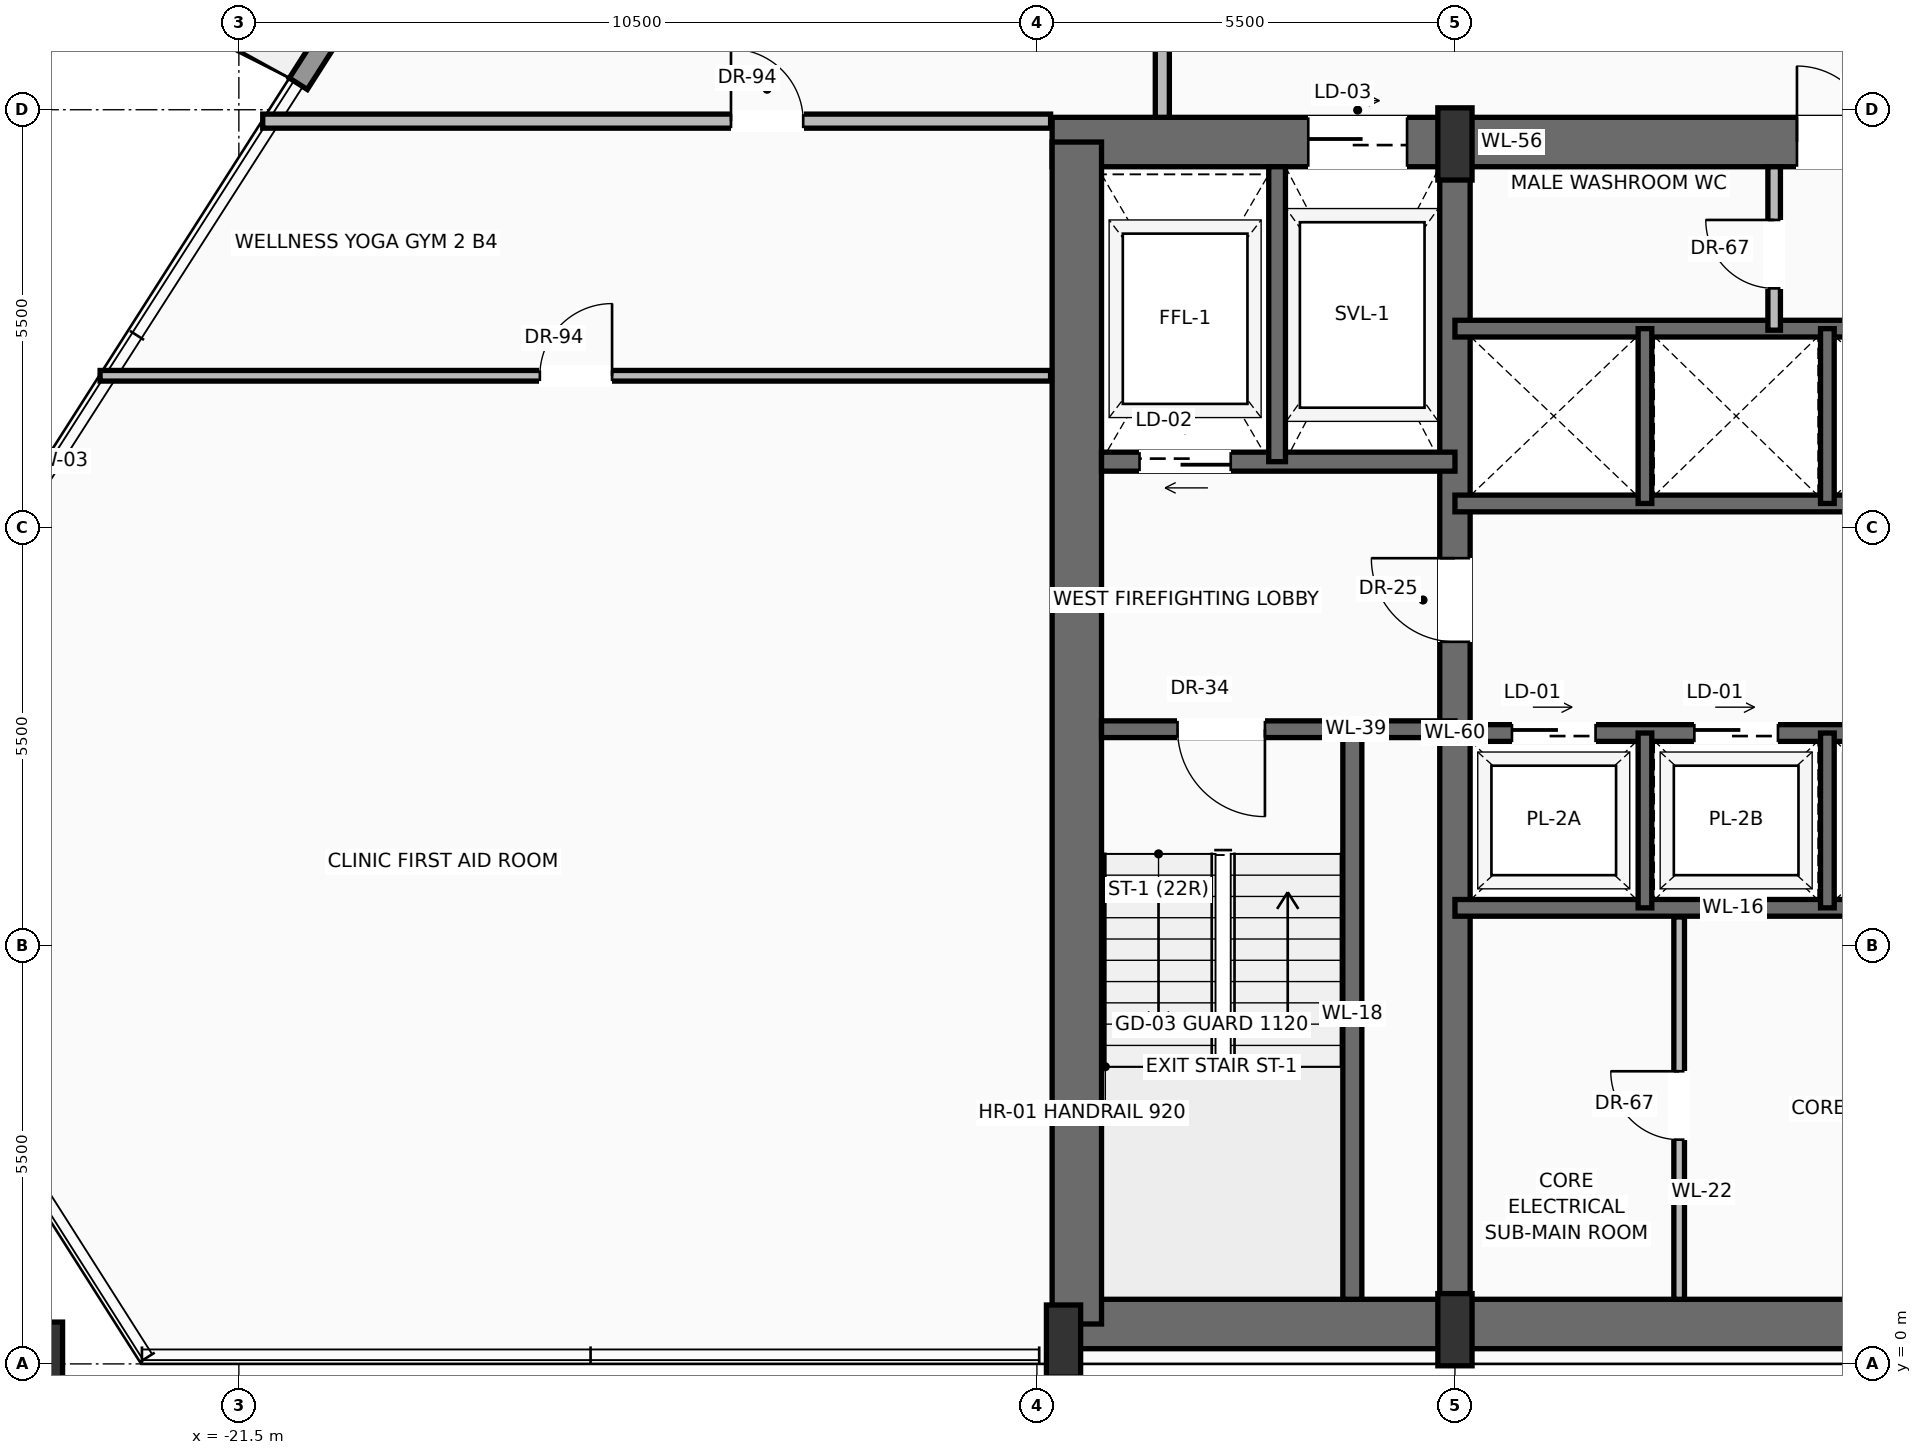
"""IFC4 building model, lengths in metres.
Left out: names, types, materials, properties, quantities, classifications, styles, units other than length and angle.
Written with IfcOpenShell. Run it as: python <this file> out.ifc"""

import sys

from ifc_helpers import new_model, si_unit, direction, frame, frame_2d, origin, origin_2d, place, context, subcontext, project, spatial, rectangle, hollow_rectangle, extrude, source, transform, mapped, element, fill, save


model = new_model("IFC4")
c1 = context("Model", 3, precision=1e-05, world=origin(), true_north=direction((0.0, 1.0)))
c2 = subcontext(c1, "Body", "Model", "MODEL_VIEW")
j1 = project(units=[si_unit("LENGTHUNIT", "METRE"), si_unit("PLANEANGLEUNIT", "RADIAN")], contexts=[c1])
p1 = place(None, origin())
s1 = spatial("IfcSite", under=j1, at=p1, CompositionType="ELEMENT")
p2 = place(p1, origin())
s2 = spatial("IfcBuilding", under=s1, at=p2, CompositionType="ELEMENT")
p3 = place(p2, frame((0.0, 0.0, 158.9)))
s3 = spatial("IfcBuildingStorey", under=s2, at=p3, CompositionType="ELEMENT", Elevation=158.9)
p4 = place(p3, frame((-10.65, 0.525, 0.0), z_axis=(0.0, 0.0, 1.0), x_axis=(1.0, 0.0, 0.0)))
e1 = element("IfcWall", 1, at=p4, inside=s3, PredefinedType="SHEAR", context=c2, shape_type="SweptSolid", body=[
    extrude(rectangle(XDim=21.3, YDim=0.65, at=frame_2d((10.65, 0.0))), origin(), (0.0, 0.0, 1.0), 3.47),
])
p5 = place(p3, frame((-10.8, 16.075, 0.0), z_axis=(0.0, 0.0, 1.0), x_axis=(1.0, 0.0, 0.0)))
e2 = element("IfcWall", 2, at=p5, inside=s3, PredefinedType="SHEAR", context=c2, shape_type="SweptSolid", body=[
    extrude(rectangle(XDim=21.6, YDim=0.65, at=frame_2d((10.8, 0.0))), origin(), (0.0, 0.0, 1.0), 3.47),
])
p6 = place(p5, frame((3.37, 0.0, 0.0)))
e3 = element("IfcOpeningElement", 3, at=p6, cuts=e2, PredefinedType="OPENING", context=c2, shape_type="SweptSolid", body=[
    extrude(rectangle(XDim=1.3, YDim=2.3, at=frame_2d((0.65, 1.15))), frame((0.0, 0.335, 0.0), z_axis=(0.0, -1.0, 0.0), x_axis=(1.0, 0.0, 0.0)), (0.0, 0.0, 1.0), 0.67),
])
p7 = place(p5, frame((9.8, 0.0, 0.0)))
e4 = element("IfcOpeningElement", 4, at=p7, cuts=e2, PredefinedType="OPENING", context=c2, shape_type="SweptSolid", body=[
    extrude(rectangle(XDim=2.0, YDim=2.4, at=frame_2d((1.0, 1.2))), frame((0.0, 0.335, 0.0), z_axis=(0.0, -1.0, 0.0), x_axis=(1.0, 0.0, 0.0)), (0.0, 0.0, 1.0), 0.67),
])
p8 = place(p3, frame((-10.475, 0.525, 0.0), z_axis=(0.0, 0.0, 1.0), x_axis=(0.0, 1.0, 0.0)))
e5 = element("IfcWall", 5, at=p8, inside=s3, PredefinedType="SHEAR", context=c2, shape_type="SweptSolid", body=[
    extrude(rectangle(XDim=15.55, YDim=0.65, at=frame_2d((7.775, 0.0))), origin(), (0.0, 0.0, 1.0), 3.47),
])
p9 = place(p3, frame((-5.5, 0.525, 0.0), z_axis=(0.0, 0.0, 1.0), x_axis=(0.0, 1.0, 0.0)))
e6 = element("IfcWall", 6, at=p9, inside=s3, PredefinedType="SHEAR", context=c2, shape_type="SweptSolid", body=[
    extrude(rectangle(XDim=15.55, YDim=0.4, at=frame_2d((7.775, 0.0))), origin(), (0.0, 0.0, 1.0), 3.47),
])
p10 = place(p9, frame((8.975, 0.0, 0.0)))
e7 = element("IfcOpeningElement", 7, at=p10, cuts=e6, PredefinedType="OPENING", context=c2, shape_type="SweptSolid", body=[
    extrude(rectangle(XDim=1.1, YDim=2.2, at=frame_2d((0.55, 1.1))), frame((0.0, 0.21, 0.0), z_axis=(0.0, -1.0, 0.0), x_axis=(1.0, 0.0, 0.0)), (0.0, 0.0, 1.0), 0.42),
])
m1 = source(origin(), c2, "Body", "SweptSolid", [
    extrude(rectangle(XDim=0.45, YDim=0.95, at=origin_2d()), origin(), (0.0, 0.0, 1.0), 3.7),
])
for number, where, z_axis, x_axis in (
    (8, (-10.65, 0.3, 0.0), (0.0, 0.0, 1.0), (1.0, 0.0, 0.0)),
    (9, (-5.5, 0.45, 0.0), (0.0, 0.0, 1.0), (1.0, 0.0, 0.0)),
    (10, (-5.5, 16.05, 0.0), (0.0, 0.0, 1.0), (1.0, 0.0, 0.0)),
):
    element("IfcColumn", number, at=place(p3, frame(where, z_axis=z_axis, x_axis=x_axis)), inside=s3, PredefinedType="PILASTER", context=c2, shape_type="MappedRepresentation", body=[
        mapped(m1, transform((0.0, 0.0, 0.0), scale=1.0)),
    ])
m2 = source(origin(), c2, "Body", "SweptSolid", [
    extrude(hollow_rectangle(XDim=1.1, YDim=1.1, WallThickness=0.055, at=origin_2d()), origin(), (0.0, 0.0, 1.0), 3.692),
])
p11 = place(p3, frame((-24.369, 0.0, 0.004), z_axis=(-0.009391120248, 0.0, 0.999955902458), x_axis=(0.0, -1.0, 0.0)))
e11 = element("IfcColumn", 11, at=p11, inside=s3, PredefinedType="COLUMN", context=c2, shape_type="MappedRepresentation", body=[
    mapped(m2, transform((0.0, 0.0, 0.0), scale=1.0)),
])
p12 = place(p3, frame((-20.718, 16.842, 0.0), z_axis=(0.0, 0.0, 1.0), x_axis=(0.538291588768, 0.842758663831, 0.0)))
e12 = element("IfcWall", 12, at=p12, inside=s3, PredefinedType="SOLIDWALL", context=c2, shape_type="SweptSolid", body=[
    extrude(rectangle(XDim=18.586, YDim=0.28, at=frame_2d((9.293, 0.0))), origin(), (0.0, 0.0, 1.0), 3.05),
])
p13 = place(p12, frame((4.461, 0.0, 0.0)))
e13 = element("IfcOpeningElement", 13, at=p13, cuts=e12, PredefinedType="OPENING", context=c2, shape_type="SweptSolid", body=[
    extrude(rectangle(XDim=1.6, YDim=2.35, at=frame_2d((0.8, 1.175))), frame((0.0, 0.15, 0.0), z_axis=(0.0, -1.0, 0.0), x_axis=(1.0, 0.0, 0.0)), (0.0, 0.0, 1.0), 0.3),
])
p14 = place(p12, frame((12.639, 0.0, 0.9)))
e14 = element("IfcOpeningElement", 14, at=p14, cuts=e12, PredefinedType="OPENING", context=c2, shape_type="SweptSolid", body=[
    extrude(rectangle(XDim=2.0, YDim=1.85, at=frame_2d((1.0, 0.925))), frame((0.0, 0.15, 0.0), z_axis=(0.0, -1.0, 0.0), x_axis=(1.0, 0.0, 0.0)), (0.0, 0.0, 1.0), 0.3),
])
p15 = place(p3, frame((-6.85, 0.85, 0.0), z_axis=(0.0, 0.0, 1.0), x_axis=(0.0, 1.0, 0.0)))
e15 = element("IfcWall", 15, at=p15, inside=s3, PredefinedType="SOLIDWALL", context=c2, shape_type="SweptSolid", body=[
    extrude(rectangle(XDim=7.5, YDim=0.25, at=frame_2d((3.75, 0.0))), origin(), (0.0, 0.0, 1.0), 3.47),
])
p16 = place(p3, frame((-5.5, 8.35, 0.0), z_axis=(0.0, 0.0, 1.0), x_axis=(-1.0, 0.0, 0.0)))
e16 = element("IfcWall", 16, at=p16, inside=s3, PredefinedType="SOLIDWALL", context=c2, shape_type="SweptSolid", body=[
    extrude(rectangle(XDim=4.65, YDim=0.22, at=frame_2d((2.325, 0.0))), origin(), (0.0, 0.0, 1.0), 3.47),
])
p17 = place(p16, frame((2.5, 0.0, 0.0)))
e17 = element("IfcOpeningElement", 17, at=p17, cuts=e16, PredefinedType="OPENING", context=c2, shape_type="SweptSolid", body=[
    extrude(rectangle(XDim=1.15, YDim=2.2, at=frame_2d((0.575, 1.1))), frame((0.0, 0.12, 0.0), z_axis=(0.0, -1.0, 0.0), x_axis=(1.0, 0.0, 0.0)), (0.0, 0.0, 1.0), 0.24),
])
p18 = place(p3, frame((-5.5, 11.87, 0.0), z_axis=(0.0, 0.0, 1.0), x_axis=(-1.0, 0.0, 0.0)))
e18 = element("IfcWall", 18, at=p18, inside=s3, PredefinedType="SOLIDWALL", context=c2, shape_type="SweptSolid", body=[
    extrude(rectangle(XDim=4.65, YDim=0.25, at=frame_2d((2.325, 0.0))), origin(), (0.0, 0.0, 1.0), 3.47),
])
p19 = place(p18, frame((2.95, 0.0, 0.0)))
e19 = element("IfcOpeningElement", 19, at=p19, cuts=e18, PredefinedType="OPENING", context=c2, shape_type="SweptSolid", body=[
    extrude(rectangle(XDim=1.2, YDim=2.25, at=frame_2d((0.6, 1.125))), frame((0.0, 0.135, 0.0), z_axis=(0.0, -1.0, 0.0), x_axis=(1.0, 0.0, 0.0)), (0.0, 0.0, 1.0), 0.27),
])
p20 = place(p3, frame((-7.84, 11.87, 0.0), z_axis=(0.0, 0.0, 1.0), x_axis=(0.0, 1.0, 0.0)))
e20 = element("IfcWall", 20, at=p20, inside=s3, PredefinedType="SOLIDWALL", context=c2, shape_type="SweptSolid", body=[
    extrude(rectangle(XDim=3.88, YDim=0.22, at=frame_2d((1.94, 0.0))), origin(), (0.0, 0.0, 1.0), 3.47),
])
p21 = place(p3, frame((-2.55, 0.85, 0.0), z_axis=(0.0, 0.0, 1.0), x_axis=(0.0, 1.0, 0.0)))
e21 = element("IfcWall", 21, at=p21, inside=s3, PredefinedType="PARTITIONING", context=c2, shape_type="SweptSolid", body=[
    extrude(rectangle(XDim=5.03, YDim=0.14, at=frame_2d((2.515, 0.0))), origin(), (0.0, 0.0, 1.0), 3.462),
])
p22 = place(p21, frame((2.1, 0.0, 0.0)))
e22 = element("IfcOpeningElement", 22, at=p22, cuts=e21, PredefinedType="OPENING", context=c2, shape_type="SweptSolid", body=[
    extrude(rectangle(XDim=0.9, YDim=2.1, at=frame_2d((0.45, 1.05))), frame((0.0, 0.08, 0.0), z_axis=(0.0, -1.0, 0.0), x_axis=(1.0, 0.0, 0.0)), (0.0, 0.0, 1.0), 0.16),
])
p23 = place(p3, frame((-5.5, 6.0, 0.0), z_axis=(0.0, 0.0, 1.0), x_axis=(1.0, 0.0, 0.0)))
e23 = element("IfcWall", 23, at=p23, inside=s3, PredefinedType="SOLIDWALL", context=c2, shape_type="SweptSolid", body=[
    extrude(rectangle(XDim=7.32, YDim=0.22, at=frame_2d((3.66, 0.0))), origin(), (0.0, 0.0, 1.0), 3.47),
])
p24 = place(p3, frame((-5.5, 8.3, 0.0), z_axis=(0.0, 0.0, 1.0), x_axis=(1.0, 0.0, 0.0)))
e24 = element("IfcWall", 24, at=p24, inside=s3, PredefinedType="SOLIDWALL", context=c2, shape_type="SweptSolid", body=[
    extrude(rectangle(XDim=7.32, YDim=0.22, at=frame_2d((3.66, 0.0))), origin(), (0.0, 0.0, 1.0), 3.47),
])
p25 = place(p24, frame((0.75, 0.0, 0.0)))
e25 = element("IfcOpeningElement", 25, at=p25, cuts=e24, PredefinedType="OPENING", context=c2, shape_type="SweptSolid", body=[
    extrude(rectangle(XDim=1.1, YDim=2.2, at=frame_2d((0.55, 1.1))), frame((0.0, 0.12, 0.0), z_axis=(0.0, -1.0, 0.0), x_axis=(1.0, 0.0, 0.0)), (0.0, 0.0, 1.0), 0.24),
])
p26 = place(p24, frame((3.15, 0.0, 0.0)))
e26 = element("IfcOpeningElement", 26, at=p26, cuts=e24, PredefinedType="OPENING", context=c2, shape_type="SweptSolid", body=[
    extrude(rectangle(XDim=1.1, YDim=2.2, at=frame_2d((0.55, 1.1))), frame((0.0, 0.12, 0.0), z_axis=(0.0, -1.0, 0.0), x_axis=(1.0, 0.0, 0.0)), (0.0, 0.0, 1.0), 0.24),
])
p27 = place(p24, frame((5.55, 0.0, 0.0)))
e27 = element("IfcOpeningElement", 27, at=p27, cuts=e24, PredefinedType="OPENING", context=c2, shape_type="SweptSolid", body=[
    extrude(rectangle(XDim=1.1, YDim=2.2, at=frame_2d((0.55, 1.1))), frame((0.0, 0.12, 0.0), z_axis=(0.0, -1.0, 0.0), x_axis=(1.0, 0.0, 0.0)), (0.0, 0.0, 1.0), 0.24),
])
for number, where, z_axis, x_axis in (
    (28, (-3.0, 6.0, 0.0), (0.0, 0.0, 1.0), (0.0, 1.0, 0.0)),
    (29, (-0.6, 6.0, 0.0), (0.0, 0.0, 1.0), (0.0, 1.0, 0.0)),
):
    element("IfcWall", number, at=place(p3, frame(where, z_axis=z_axis, x_axis=x_axis)), inside=s3, PredefinedType="SOLIDWALL", context=c2, shape_type="SweptSolid", body=[
        extrude(rectangle(XDim=2.3, YDim=0.18, at=frame_2d((1.15, 0.0))), origin(), (0.0, 0.0, 1.0), 3.47),
    ])
for number, where, z_axis, x_axis in (
    (30, (-5.5, 11.32, 0.0), (0.0, 0.0, 1.0), (1.0, 0.0, 0.0)),
    (31, (-5.5, 13.62, 0.0), (0.0, 0.0, 1.0), (1.0, 0.0, 0.0)),
):
    element("IfcWall", number, at=place(p3, frame(where, z_axis=z_axis, x_axis=x_axis)), inside=s3, PredefinedType="SOLIDWALL", context=c2, shape_type="SweptSolid", body=[
        extrude(rectangle(XDim=7.32, YDim=0.22, at=frame_2d((3.66, 0.0))), origin(), (0.0, 0.0, 1.0), 3.47),
    ])
for number, where, z_axis, x_axis in (
    (32, (-3.0, 11.32, 0.0), (0.0, 0.0, 1.0), (0.0, 1.0, 0.0)),
    (33, (-0.6, 11.32, 0.0), (0.0, 0.0, 1.0), (0.0, 1.0, 0.0)),
):
    element("IfcWall", number, at=place(p3, frame(where, z_axis=z_axis, x_axis=x_axis)), inside=s3, PredefinedType="SOLIDWALL", context=c2, shape_type="SweptSolid", body=[
        extrude(rectangle(XDim=2.3, YDim=0.18, at=frame_2d((1.15, 0.0))), origin(), (0.0, 0.0, 1.0), 3.47),
    ])
p28 = place(p3, frame((-1.3, 13.6, 0.0), z_axis=(0.0, 0.0, 1.0), x_axis=(0.0, 1.0, 0.0)))
e34 = element("IfcWall", 34, at=p28, inside=s3, PredefinedType="PARTITIONING", context=c2, shape_type="SweptSolid", body=[
    extrude(rectangle(XDim=2.15, YDim=0.165, at=frame_2d((1.075, 0.0))), origin(), (0.0, 0.0, 1.0), 3.462),
])
p29 = place(p28, frame((0.55, 0.0, 0.0)))
e35 = element("IfcOpeningElement", 35, at=p29, cuts=e34, PredefinedType="OPENING", context=c2, shape_type="SweptSolid", body=[
    extrude(rectangle(XDim=0.9, YDim=2.1, at=frame_2d((0.45, 1.05))), frame((0.0, 0.093, 0.0), z_axis=(0.0, -1.0, 0.0), x_axis=(1.0, 0.0, 0.0)), (0.0, 0.0, 1.0), 0.185),
])
p30 = place(p3, frame((-9.35, 16.4, 0.0), z_axis=(0.0, 0.0, 1.0), x_axis=(0.0, 1.0, 0.0)))
e36 = element("IfcWall", 36, at=p30, inside=s3, PredefinedType="PARTITIONING", context=c2, shape_type="SweptSolid", body=[
    extrude(rectangle(XDim=7.8, YDim=0.185, at=frame_2d((3.9, 0.0))), origin(), (0.0, 0.0, 1.0), 3.462),
])
p31 = place(p30, frame((3.069, 0.0, 0.0)))
e37 = element("IfcOpeningElement", 37, at=p31, cuts=e36, PredefinedType="OPENING", context=c2, shape_type="SweptSolid", body=[
    extrude(rectangle(XDim=0.95, YDim=2.2, at=frame_2d((0.475, 1.1))), frame((0.0, 0.103, 0.0), z_axis=(0.0, -1.0, 0.0), x_axis=(1.0, 0.0, 0.0)), (0.0, 0.0, 1.0), 0.205),
])
p32 = place(p3, frame((-21.186, 16.35, 0.0), z_axis=(0.0, 0.0, 1.0), x_axis=(1.0, 0.0, 0.0)))
e38 = element("IfcWall", 38, at=p32, inside=s3, PredefinedType="PARTITIONING", context=c2, shape_type="SweptSolid", body=[
    extrude(rectangle(XDim=10.366, YDim=0.185, at=frame_2d((5.183, 0.0))), origin(), (0.0, 0.0, 1.0), 3.462),
])
p33 = place(p32, frame((6.161, 0.0, 0.0)))
e39 = element("IfcOpeningElement", 39, at=p33, cuts=e38, PredefinedType="OPENING", context=c2, shape_type="SweptSolid", body=[
    extrude(rectangle(XDim=0.95, YDim=2.2, at=frame_2d((0.475, 1.1))), frame((0.0, 0.103, 0.0), z_axis=(0.0, -1.0, 0.0), x_axis=(1.0, 0.0, 0.0)), (0.0, 0.0, 1.0), 0.205),
])
p34 = place(p3, frame((-23.326, 13.0, 0.0), z_axis=(0.0, 0.0, 1.0), x_axis=(1.0, 0.0, 0.0)))
e40 = element("IfcWall", 40, at=p34, inside=s3, PredefinedType="PARTITIONING", context=c2, shape_type="SweptSolid", body=[
    extrude(rectangle(XDim=12.506, YDim=0.14, at=frame_2d((6.253, 0.0))), origin(), (0.0, 0.0, 1.0), 3.462),
])
p35 = place(p34, frame((5.786, 0.0, 0.0)))
e41 = element("IfcOpeningElement", 41, at=p35, cuts=e40, PredefinedType="OPENING", context=c2, shape_type="SweptSolid", body=[
    extrude(rectangle(XDim=0.95, YDim=2.2, at=frame_2d((0.475, 1.1))), frame((0.0, 0.08, 0.0), z_axis=(0.0, -1.0, 0.0), x_axis=(1.0, 0.0, 0.0)), (0.0, 0.0, 1.0), 0.16),
])
m3 = source(origin(), c2, "Body", "SweptSolid", [
    extrude(rectangle(XDim=1.15, YDim=2.2, at=frame_2d((0.575, 1.1))), frame((0.0, 0.025, 0.0), z_axis=(0.0, -1.0, 0.0), x_axis=(1.0, 0.0, 0.0)), (0.0, 0.0, 1.0), 0.05),
])
p36 = place(p17, origin())
e42 = element("IfcDoor", 42, at=p36, inside=s3, OperationType="SINGLE_SWING_LEFT", PredefinedType="DOOR", context=c2, shape_type="MappedRepresentation", body=[
    mapped(m3, transform((0.0, 0.0, 0.0), scale=1.0)),
])
fill(e17, e42)
m4 = source(origin(), c2, "Body", "SweptSolid", [
    extrude(rectangle(XDim=1.1, YDim=2.2, at=frame_2d((0.55, 1.1))), frame((0.0, 0.025, 0.0), z_axis=(0.0, -1.0, 0.0), x_axis=(1.0, 0.0, 0.0)), (0.0, 0.0, 1.0), 0.05),
])
p37 = place(p10, origin())
e43 = element("IfcDoor", 43, at=p37, inside=s3, OperationType="SINGLE_SWING_RIGHT", PredefinedType="DOOR", context=c2, shape_type="MappedRepresentation", body=[
    mapped(m4, transform((0.0, 0.0, 0.0), scale=1.0)),
])
fill(e7, e43)
m5 = source(origin(), c2, "Body", "SweptSolid", [
    extrude(rectangle(XDim=1.2, YDim=2.25, at=frame_2d((0.6, 1.125))), frame((0.0, 0.025, 0.0), z_axis=(0.0, -1.0, 0.0), x_axis=(1.0, 0.0, 0.0)), (0.0, 0.0, 1.0), 0.05),
])
p38 = place(p19, origin())
e44 = element("IfcDoor", 44, at=p38, inside=s3, OperationType="SLIDING_TO_LEFT", PredefinedType="DOOR", context=c2, shape_type="MappedRepresentation", body=[
    mapped(m5, transform((0.0, 0.0, 0.0), scale=1.0)),
])
fill(e19, e44)
m6 = source(origin(), c2, "Body", "SweptSolid", [
    extrude(rectangle(XDim=1.3, YDim=2.3, at=frame_2d((0.65, 1.15))), frame((0.0, 0.025, 0.0), z_axis=(0.0, -1.0, 0.0), x_axis=(1.0, 0.0, 0.0)), (0.0, 0.0, 1.0), 0.05),
])
p39 = place(p6, origin())
e45 = element("IfcDoor", 45, at=p39, inside=s3, OperationType="SLIDING_TO_RIGHT", PredefinedType="DOOR", context=c2, shape_type="MappedRepresentation", body=[
    mapped(m6, transform((0.0, 0.0, 0.0), scale=1.0)),
])
fill(e3, e45)
m7 = source(origin(), c2, "Body", "SweptSolid", [
    extrude(rectangle(XDim=2.0, YDim=2.4, at=frame_2d((1.0, 1.2))), frame((0.0, 0.025, 0.0), z_axis=(0.0, -1.0, 0.0), x_axis=(1.0, 0.0, 0.0)), (0.0, 0.0, 1.0), 0.05),
])
p40 = place(p7, origin())
e46 = element("IfcDoor", 46, at=p40, inside=s3, OperationType="DOUBLE_DOOR_SINGLE_SWING", PredefinedType="DOOR", context=c2, shape_type="MappedRepresentation", body=[
    mapped(m7, transform((0.0, 0.0, 0.0), scale=1.0)),
])
fill(e4, e46)
m8 = source(origin(), c2, "Body", "SweptSolid", [
    extrude(rectangle(XDim=0.9, YDim=2.1, at=frame_2d((0.45, 1.05))), frame((0.0, 0.025, 0.0), z_axis=(0.0, -1.0, 0.0), x_axis=(1.0, 0.0, 0.0)), (0.0, 0.0, 1.0), 0.05),
])
p41 = place(p22, origin())
e47 = element("IfcDoor", 47, at=p41, inside=s3, OperationType="SINGLE_SWING_RIGHT", PredefinedType="DOOR", context=c2, shape_type="MappedRepresentation", body=[
    mapped(m8, transform((0.0, 0.0, 0.0), scale=1.0)),
])
fill(e22, e47)
m9 = source(origin(), c2, "Body", "SweptSolid", [
    extrude(rectangle(XDim=1.1, YDim=2.2, at=frame_2d((0.55, 1.1))), frame((0.0, 0.025, 0.0), z_axis=(0.0, -1.0, 0.0), x_axis=(1.0, 0.0, 0.0)), (0.0, 0.0, 1.0), 0.05),
])
p42 = place(p25, origin())
e48 = element("IfcDoor", 48, at=p42, inside=s3, OperationType="SLIDING_TO_LEFT", PredefinedType="DOOR", context=c2, shape_type="MappedRepresentation", body=[
    mapped(m9, transform((0.0, 0.0, 0.0), scale=1.0)),
])
fill(e25, e48)
p43 = place(p26, origin())
e49 = element("IfcDoor", 49, at=p43, inside=s3, OperationType="SLIDING_TO_LEFT", PredefinedType="DOOR", context=c2, shape_type="MappedRepresentation", body=[
    mapped(m9, transform((0.0, 0.0, 0.0), scale=1.0)),
])
fill(e26, e49)
p44 = place(p29, origin())
e50 = element("IfcDoor", 50, at=p44, inside=s3, OperationType="SINGLE_SWING_RIGHT", PredefinedType="DOOR", context=c2, shape_type="MappedRepresentation", body=[
    mapped(m8, transform((0.0, 0.0, 0.0), scale=1.0)),
])
fill(e35, e50)
m10 = source(origin(), c2, "Body", "SweptSolid", [
    extrude(rectangle(XDim=0.95, YDim=2.2, at=frame_2d((0.475, 1.1))), frame((0.0, 0.025, 0.0), z_axis=(0.0, -1.0, 0.0), x_axis=(1.0, 0.0, 0.0)), (0.0, 0.0, 1.0), 0.05),
])
p45 = place(p33, origin())
e51 = element("IfcDoor", 51, at=p45, inside=s3, OperationType="SINGLE_SWING_LEFT", PredefinedType="DOOR", context=c2, shape_type="MappedRepresentation", body=[
    mapped(m10, transform((0.0, 0.0, 0.0), scale=1.0)),
])
fill(e39, e51)
p46 = place(p35, origin())
e52 = element("IfcDoor", 52, at=p46, inside=s3, OperationType="SINGLE_SWING_RIGHT", PredefinedType="DOOR", context=c2, shape_type="MappedRepresentation", body=[
    mapped(m10, transform((0.0, 0.0, 0.0), scale=1.0)),
])
fill(e41, e52)
save(model, sys.argv[1])
